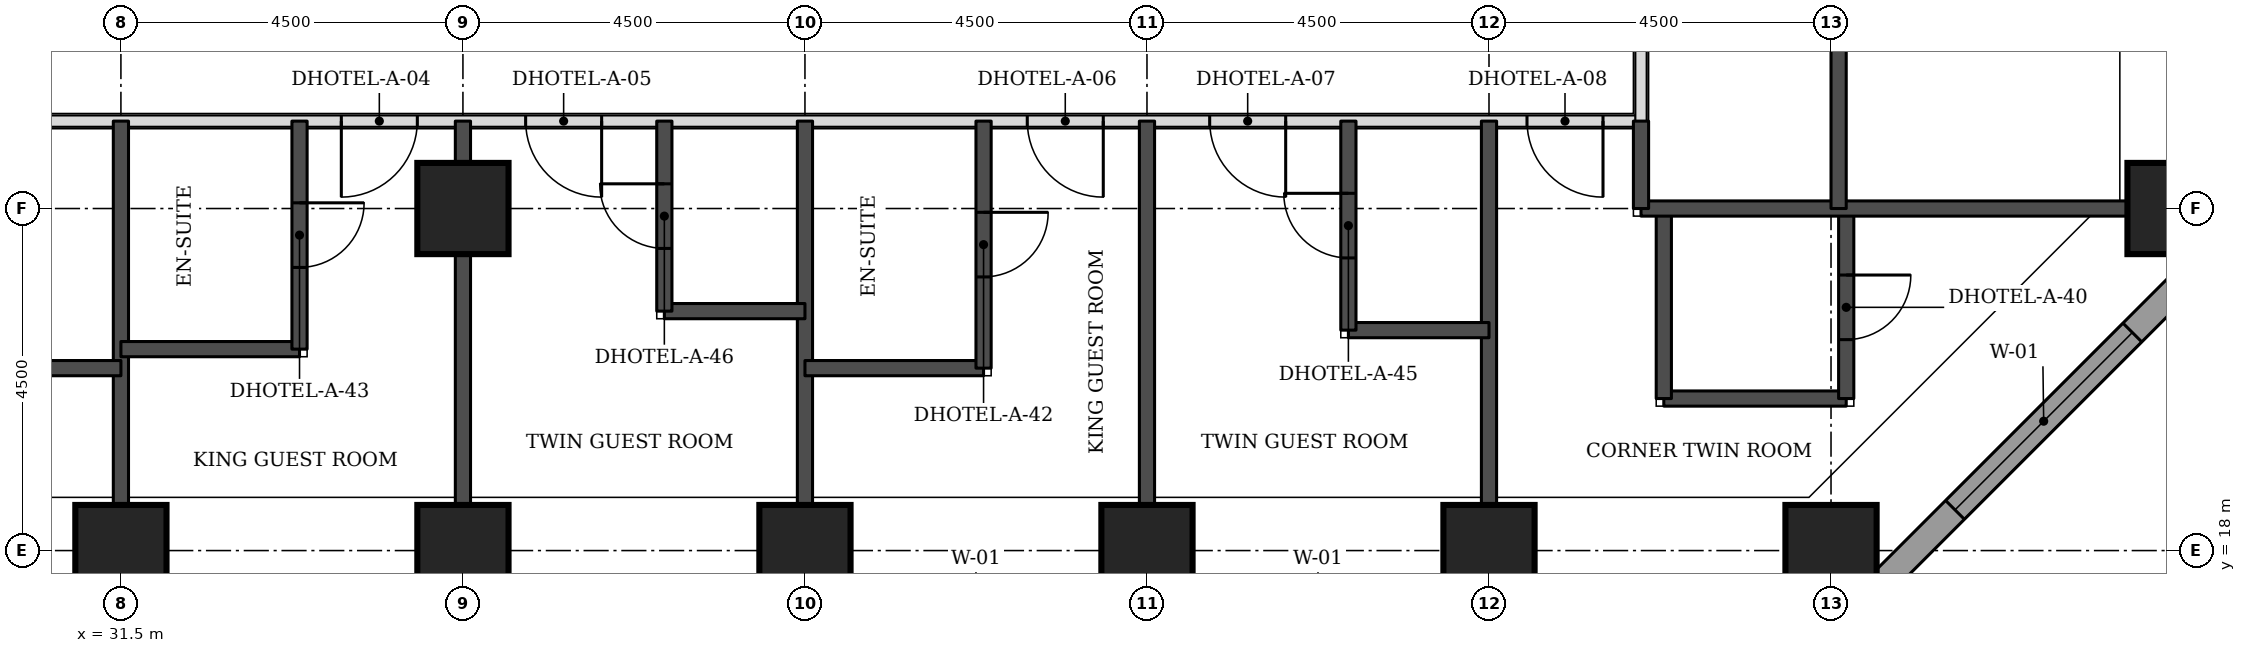
"""IFC4 building model, lengths in metres.
Left out: names, types, materials, properties, quantities, classifications, styles, units other than length and angle.
Written with IfcOpenShell. Run it as: python <this file> out.ifc"""

import sys

from ifc_helpers import new_model, si_unit, direction, frame, frame_2d, origin, origin_2d, place, context, subcontext, project, spatial, rectangle, extrude, element, fill, save


model = new_model("IFC4")
c1 = context("Model", 3, precision=1e-05, world=origin(), true_north=direction((0.0, 1.0)))
c2 = subcontext(c1, "Body", "Model", "MODEL_VIEW")
j1 = project(units=[si_unit("LENGTHUNIT", "METRE"), si_unit("PLANEANGLEUNIT", "RADIAN")], contexts=[c1])
p1 = place(None, origin())
s1 = spatial("IfcSite", under=j1, at=p1, CompositionType="ELEMENT")
p2 = place(p1, origin())
s2 = spatial("IfcBuilding", under=s1, at=p2, CompositionType="ELEMENT")
p3 = place(p2, frame((0.0, 0.0, 26.4)))
s3 = spatial("IfcBuildingStorey", under=s2, at=p3, CompositionType="ELEMENT", Elevation=26.4)
for number, where, z_axis, x_axis in (
    (1, (31.5, 18.0, 0.0), (0.0, 0.0, 1.0), (1.0, 0.0, 0.0)),
    (2, (36.0, 18.0, 0.0), (0.0, 0.0, 1.0), (1.0, 0.0, 0.0)),
    (3, (40.5, 18.0, 0.0), (0.0, 0.0, 1.0), (1.0, 0.0, 0.0)),
    (4, (45.0, 18.0, 0.0), (0.0, 0.0, 1.0), (1.0, 0.0, 0.0)),
    (5, (49.5, 18.0, 0.0), (0.0, 0.0, 1.0), (1.0, 0.0, 0.0)),
    (6, (54.0, 18.0, 0.0), (0.0, 0.0, 1.0), (1.0, 0.0, 0.0)),
    (7, (36.0, 22.5, 0.0), (0.0, 0.0, 1.0), (1.0, 0.0, 0.0)),
    (8, (58.5, 22.5, 0.0), (0.0, 0.0, 1.0), (1.0, 0.0, 0.0)),
):
    element("IfcColumn", number, at=place(p3, frame(where, z_axis=z_axis, x_axis=x_axis)), inside=s3, PredefinedType="COLUMN", context=c2, shape_type="SweptSolid", body=[
        extrude(rectangle(XDim=1.2, YDim=1.2, at=origin_2d()), origin(), (0.0, 0.0, 1.0), 3.3),
    ])
p4 = place(p3, frame((54.27, 17.174, 0.0), z_axis=(0.0, 0.0, 1.0), x_axis=(0.707106781187, 0.707106781187, 0.0)))
e9 = element("IfcWall", 9, at=p4, inside=s3, PredefinedType="STANDARD", context=c2, shape_type="SweptSolid", body=[
    extrude(rectangle(XDim=7.151, YDim=0.35, at=frame_2d((3.576, 0.0))), origin(), (0.0, 0.0, 1.0), 3.055),
])
p5 = place(p4, frame((1.926, 0.0, 0.8)))
e10 = element("IfcOpeningElement", 10, at=p5, cuts=e9, PredefinedType="OPENING", context=c2, shape_type="SweptSolid", body=[
    extrude(rectangle(XDim=3.3, YDim=1.5, at=frame_2d((1.65, 0.75))), frame((0.0, 0.185, 0.0), z_axis=(0.0, -1.0, 0.0), x_axis=(1.0, 0.0, 0.0)), (0.0, 0.0, 1.0), 0.37),
])
p6 = place(p3, frame((19.15, 23.65, 0.0), z_axis=(0.0, 0.0, 1.0), x_axis=(1.0, 0.0, 0.0)))
e11 = element("IfcWall", 11, at=p6, inside=s3, PredefinedType="PARTITIONING", context=c2, shape_type="SweptSolid", body=[
    extrude(rectangle(XDim=32.35, YDim=0.15, at=frame_2d((16.175, 0.0))), origin(), (0.0, 0.0, 1.0), 3.08),
])
p7 = place(p6, frame((6.275, 0.0, 0.0)))
e12 = element("IfcOpeningElement", 12, at=p7, cuts=e11, PredefinedType="OPENING", context=c2, shape_type="SweptSolid", body=[
    extrude(rectangle(XDim=1.0, YDim=2.1, at=frame_2d((0.5, 1.05))), frame((0.0, 0.085, 0.0), z_axis=(0.0, -1.0, 0.0), x_axis=(1.0, 0.0, 0.0)), (0.0, 0.0, 1.0), 0.17),
])
p8 = place(p6, frame((8.675, 0.0, 0.0)))
e13 = element("IfcOpeningElement", 13, at=p8, cuts=e11, PredefinedType="OPENING", context=c2, shape_type="SweptSolid", body=[
    extrude(rectangle(XDim=1.0, YDim=2.1, at=frame_2d((0.5, 1.05))), frame((0.0, 0.085, 0.0), z_axis=(0.0, -1.0, 0.0), x_axis=(1.0, 0.0, 0.0)), (0.0, 0.0, 1.0), 0.17),
])
p9 = place(p6, frame((15.25, 0.0, 0.0)))
e14 = element("IfcOpeningElement", 14, at=p9, cuts=e11, PredefinedType="OPENING", context=c2, shape_type="SweptSolid", body=[
    extrude(rectangle(XDim=1.0, YDim=2.1, at=frame_2d((0.5, 1.05))), frame((0.0, 0.085, 0.0), z_axis=(0.0, -1.0, 0.0), x_axis=(1.0, 0.0, 0.0)), (0.0, 0.0, 1.0), 0.17),
])
p10 = place(p6, frame((17.675, 0.0, 0.0)))
e15 = element("IfcOpeningElement", 15, at=p10, cuts=e11, PredefinedType="OPENING", context=c2, shape_type="SweptSolid", body=[
    extrude(rectangle(XDim=1.0, YDim=2.1, at=frame_2d((0.5, 1.05))), frame((0.0, 0.085, 0.0), z_axis=(0.0, -1.0, 0.0), x_axis=(1.0, 0.0, 0.0)), (0.0, 0.0, 1.0), 0.17),
])
p11 = place(p6, frame((24.275, 0.0, 0.0)))
e16 = element("IfcOpeningElement", 16, at=p11, cuts=e11, PredefinedType="OPENING", context=c2, shape_type="SweptSolid", body=[
    extrude(rectangle(XDim=1.0, YDim=2.1, at=frame_2d((0.5, 1.05))), frame((0.0, 0.085, 0.0), z_axis=(0.0, -1.0, 0.0), x_axis=(1.0, 0.0, 0.0)), (0.0, 0.0, 1.0), 0.17),
])
p12 = place(p6, frame((26.675, 0.0, 0.0)))
e17 = element("IfcOpeningElement", 17, at=p12, cuts=e11, PredefinedType="OPENING", context=c2, shape_type="SweptSolid", body=[
    extrude(rectangle(XDim=1.0, YDim=2.1, at=frame_2d((0.5, 1.05))), frame((0.0, 0.085, 0.0), z_axis=(0.0, -1.0, 0.0), x_axis=(1.0, 0.0, 0.0)), (0.0, 0.0, 1.0), 0.17),
])
p13 = place(p6, frame((1.175, 0.0, 0.0)))
e18 = element("IfcOpeningElement", 18, at=p13, cuts=e11, PredefinedType="OPENING", context=c2, shape_type="SweptSolid", body=[
    extrude(rectangle(XDim=1.0, YDim=2.1, at=frame_2d((0.5, 1.05))), frame((0.0, 0.085, 0.0), z_axis=(0.0, -1.0, 0.0), x_axis=(1.0, 0.0, 0.0)), (0.0, 0.0, 1.0), 0.17),
])
p14 = place(p6, frame((30.85, 0.0, 0.0)))
e19 = element("IfcOpeningElement", 19, at=p14, cuts=e11, PredefinedType="OPENING", context=c2, shape_type="SweptSolid", body=[
    extrude(rectangle(XDim=1.0, YDim=2.1, at=frame_2d((0.5, 1.05))), frame((0.0, 0.085, 0.0), z_axis=(0.0, -1.0, 0.0), x_axis=(1.0, 0.0, 0.0)), (0.0, 0.0, 1.0), 0.17),
])
p15 = place(p3, frame((51.5, 23.65, 0.0), z_axis=(0.0, 0.0, 1.0), x_axis=(0.0, 1.0, 0.0)))
e20 = element("IfcWall", 20, at=p15, inside=s3, PredefinedType="PARTITIONING", context=c2, shape_type="SweptSolid", body=[
    extrude(rectangle(XDim=23.85, YDim=0.15, at=frame_2d((11.925, 0.0))), origin(), (0.0, 0.0, 1.0), 3.08),
])
p16 = place(p15, frame((4.075, 0.0, 0.0)))
e21 = element("IfcOpeningElement", 21, at=p16, cuts=e20, PredefinedType="OPENING", context=c2, shape_type="SweptSolid", body=[
    extrude(rectangle(XDim=1.0, YDim=2.1, at=frame_2d((0.5, 1.05))), frame((0.0, 0.085, 0.0), z_axis=(0.0, -1.0, 0.0), x_axis=(1.0, 0.0, 0.0)), (0.0, 0.0, 1.0), 0.17),
])
p17 = place(p15, frame((10.375, 0.0, 0.0)))
e22 = element("IfcOpeningElement", 22, at=p17, cuts=e20, PredefinedType="OPENING", context=c2, shape_type="SweptSolid", body=[
    extrude(rectangle(XDim=1.0, YDim=2.1, at=frame_2d((0.5, 1.05))), frame((0.0, 0.085, 0.0), z_axis=(0.0, -1.0, 0.0), x_axis=(1.0, 0.0, 0.0)), (0.0, 0.0, 1.0), 0.17),
])
p18 = place(p15, frame((19.9, 0.0, 0.0)))
e23 = element("IfcOpeningElement", 23, at=p18, cuts=e20, PredefinedType="OPENING", context=c2, shape_type="SweptSolid", body=[
    extrude(rectangle(XDim=0.9, YDim=2.1, at=frame_2d((0.45, 1.05))), frame((0.0, 0.085, 0.0), z_axis=(0.0, -1.0, 0.0), x_axis=(1.0, 0.0, 0.0)), (0.0, 0.0, 1.0), 0.17),
])
for number, where, z_axis, x_axis in (
    (24, (31.5, 18.6, 0.0), (0.0, 0.0, 1.0), (0.0, 1.0, 0.0)),
    (25, (36.0, 18.6, 0.0), (0.0, 0.0, 1.0), (0.0, 1.0, 0.0)),
    (26, (40.5, 18.6, 0.0), (0.0, 0.0, 1.0), (0.0, 1.0, 0.0)),
    (27, (45.0, 18.6, 0.0), (0.0, 0.0, 1.0), (0.0, 1.0, 0.0)),
    (28, (49.5, 18.6, 0.0), (0.0, 0.0, 1.0), (0.0, 1.0, 0.0)),
):
    element("IfcWall", number, at=place(p3, frame(where, z_axis=z_axis, x_axis=x_axis)), inside=s3, PredefinedType="SOLIDWALL", context=c2, shape_type="SweptSolid", body=[
        extrude(rectangle(XDim=5.05, YDim=0.2, at=frame_2d((2.525, 0.0))), origin(), (0.0, 0.0, 1.0), 3.08),
    ])
p19 = place(p3, frame((51.8, 20.0, 0.0), z_axis=(0.0, 0.0, 1.0), x_axis=(1.0, 0.0, 0.0)))
e29 = element("IfcWall", 29, at=p19, inside=s3, PredefinedType="SOLIDWALL", context=c2, shape_type="SweptSolid", body=[
    extrude(rectangle(XDim=2.4, YDim=0.2, at=frame_2d((1.2, 0.0))), origin(), (0.0, 0.0, 1.0), 3.08),
])
p20 = place(p3, frame((51.8, 20.0, 0.0), z_axis=(0.0, 0.0, 1.0), x_axis=(0.0, 1.0, 0.0)))
e30 = element("IfcWall", 30, at=p20, inside=s3, PredefinedType="SOLIDWALL", context=c2, shape_type="SweptSolid", body=[
    extrude(rectangle(XDim=2.5, YDim=0.2, at=frame_2d((1.25, 0.0))), origin(), (0.0, 0.0, 1.0), 3.08),
])
p21 = place(p3, frame((54.2, 20.0, 0.0), z_axis=(0.0, 0.0, 1.0), x_axis=(0.0, 1.0, 0.0)))
e31 = element("IfcWall", 31, at=p21, inside=s3, PredefinedType="SOLIDWALL", context=c2, shape_type="SweptSolid", body=[
    extrude(rectangle(XDim=2.5, YDim=0.2, at=frame_2d((1.25, 0.0))), origin(), (0.0, 0.0, 1.0), 3.08),
])
p22 = place(p21, frame((0.775, 0.0, 0.0)))
e32 = element("IfcOpeningElement", 32, at=p22, cuts=e31, PredefinedType="OPENING", context=c2, shape_type="SweptSolid", body=[
    extrude(rectangle(XDim=0.85, YDim=2.1, at=frame_2d((0.425, 1.05))), frame((0.0, 0.11, 0.0), z_axis=(0.0, -1.0, 0.0), x_axis=(1.0, 0.0, 0.0)), (0.0, 0.0, 1.0), 0.22),
])
p23 = place(p3, frame((29.65, 20.4, 0.0), z_axis=(0.0, 0.0, 1.0), x_axis=(1.0, 0.0, 0.0)))
e33 = element("IfcWall", 33, at=p23, inside=s3, PredefinedType="SOLIDWALL", context=c2, shape_type="SweptSolid", body=[
    extrude(rectangle(XDim=1.85, YDim=0.2, at=frame_2d((0.925, 0.0))), origin(), (0.0, 0.0, 1.0), 3.08),
])
p24 = place(p3, frame((40.5, 20.4, 0.0), z_axis=(0.0, 0.0, 1.0), x_axis=(1.0, 0.0, 0.0)))
e34 = element("IfcWall", 34, at=p24, inside=s3, PredefinedType="SOLIDWALL", context=c2, shape_type="SweptSolid", body=[
    extrude(rectangle(XDim=2.35, YDim=0.2, at=frame_2d((1.175, 0.0))), origin(), (0.0, 0.0, 1.0), 3.08),
])
p25 = place(p3, frame((42.85, 20.4, 0.0), z_axis=(0.0, 0.0, 1.0), x_axis=(0.0, 1.0, 0.0)))
e35 = element("IfcWall", 35, at=p25, inside=s3, PredefinedType="SOLIDWALL", context=c2, shape_type="SweptSolid", body=[
    extrude(rectangle(XDim=3.25, YDim=0.2, at=frame_2d((1.625, 0.0))), origin(), (0.0, 0.0, 1.0), 3.08),
])
p26 = place(p25, frame((1.2, 0.0, 0.0)))
e36 = element("IfcOpeningElement", 36, at=p26, cuts=e35, PredefinedType="OPENING", context=c2, shape_type="SweptSolid", body=[
    extrude(rectangle(XDim=0.85, YDim=2.1, at=frame_2d((0.425, 1.05))), frame((0.0, 0.11, 0.0), z_axis=(0.0, -1.0, 0.0), x_axis=(1.0, 0.0, 0.0)), (0.0, 0.0, 1.0), 0.22),
])
p27 = place(p3, frame((31.5, 20.65, 0.0), z_axis=(0.0, 0.0, 1.0), x_axis=(1.0, 0.0, 0.0)))
e37 = element("IfcWall", 37, at=p27, inside=s3, PredefinedType="SOLIDWALL", context=c2, shape_type="SweptSolid", body=[
    extrude(rectangle(XDim=2.35, YDim=0.2, at=frame_2d((1.175, 0.0))), origin(), (0.0, 0.0, 1.0), 3.08),
])
p28 = place(p3, frame((33.85, 20.65, 0.0), z_axis=(0.0, 0.0, 1.0), x_axis=(0.0, 1.0, 0.0)))
e38 = element("IfcWall", 38, at=p28, inside=s3, PredefinedType="SOLIDWALL", context=c2, shape_type="SweptSolid", body=[
    extrude(rectangle(XDim=3.0, YDim=0.2, at=frame_2d((1.5, 0.0))), origin(), (0.0, 0.0, 1.0), 3.08),
])
p29 = place(p28, frame((1.075, 0.0, 0.0)))
e39 = element("IfcOpeningElement", 39, at=p29, cuts=e38, PredefinedType="OPENING", context=c2, shape_type="SweptSolid", body=[
    extrude(rectangle(XDim=0.85, YDim=2.1, at=frame_2d((0.425, 1.05))), frame((0.0, 0.11, 0.0), z_axis=(0.0, -1.0, 0.0), x_axis=(1.0, 0.0, 0.0)), (0.0, 0.0, 1.0), 0.22),
])
p30 = place(p3, frame((47.65, 20.9, 0.0), z_axis=(0.0, 0.0, 1.0), x_axis=(1.0, 0.0, 0.0)))
e40 = element("IfcWall", 40, at=p30, inside=s3, PredefinedType="SOLIDWALL", context=c2, shape_type="SweptSolid", body=[
    extrude(rectangle(XDim=1.85, YDim=0.2, at=frame_2d((0.925, 0.0))), origin(), (0.0, 0.0, 1.0), 3.08),
])
p31 = place(p3, frame((47.65, 20.9, 0.0), z_axis=(0.0, 0.0, 1.0), x_axis=(0.0, 1.0, 0.0)))
e41 = element("IfcWall", 41, at=p31, inside=s3, PredefinedType="SOLIDWALL", context=c2, shape_type="SweptSolid", body=[
    extrude(rectangle(XDim=2.75, YDim=0.2, at=frame_2d((1.375, 0.0))), origin(), (0.0, 0.0, 1.0), 3.08),
])
p32 = place(p31, frame((0.95, 0.0, 0.0)))
e42 = element("IfcOpeningElement", 42, at=p32, cuts=e41, PredefinedType="OPENING", context=c2, shape_type="SweptSolid", body=[
    extrude(rectangle(XDim=0.85, YDim=2.1, at=frame_2d((0.425, 1.05))), frame((0.0, 0.11, 0.0), z_axis=(0.0, -1.0, 0.0), x_axis=(1.0, 0.0, 0.0)), (0.0, 0.0, 1.0), 0.22),
])
p33 = place(p3, frame((38.65, 21.15, 0.0), z_axis=(0.0, 0.0, 1.0), x_axis=(1.0, 0.0, 0.0)))
e43 = element("IfcWall", 43, at=p33, inside=s3, PredefinedType="SOLIDWALL", context=c2, shape_type="SweptSolid", body=[
    extrude(rectangle(XDim=1.85, YDim=0.2, at=frame_2d((0.925, 0.0))), origin(), (0.0, 0.0, 1.0), 3.08),
])
p34 = place(p3, frame((38.65, 21.15, 0.0), z_axis=(0.0, 0.0, 1.0), x_axis=(0.0, 1.0, 0.0)))
e44 = element("IfcWall", 44, at=p34, inside=s3, PredefinedType="SOLIDWALL", context=c2, shape_type="SweptSolid", body=[
    extrude(rectangle(XDim=2.5, YDim=0.2, at=frame_2d((1.25, 0.0))), origin(), (0.0, 0.0, 1.0), 3.08),
])
p35 = place(p34, frame((0.825, 0.0, 0.0)))
e45 = element("IfcOpeningElement", 45, at=p35, cuts=e44, PredefinedType="OPENING", context=c2, shape_type="SweptSolid", body=[
    extrude(rectangle(XDim=0.85, YDim=2.1, at=frame_2d((0.425, 1.05))), frame((0.0, 0.11, 0.0), z_axis=(0.0, -1.0, 0.0), x_axis=(1.0, 0.0, 0.0)), (0.0, 0.0, 1.0), 0.22),
])
p36 = place(p3, frame((51.5, 22.5, 0.0), z_axis=(0.0, 0.0, 1.0), x_axis=(1.0, 0.0, 0.0)))
e46 = element("IfcWall", 46, at=p36, inside=s3, PredefinedType="SOLIDWALL", context=c2, shape_type="SweptSolid", body=[
    extrude(rectangle(XDim=6.4, YDim=0.2, at=frame_2d((3.2, 0.0))), origin(), (0.0, 0.0, 1.0), 3.08),
])
p37 = place(p3, frame((51.5, 22.5, 0.0), z_axis=(0.0, 0.0, 1.0), x_axis=(0.0, 1.0, 0.0)))
e47 = element("IfcWall", 47, at=p37, inside=s3, PredefinedType="SOLIDWALL", context=c2, shape_type="SweptSolid", body=[
    extrude(rectangle(XDim=1.15, YDim=0.2, at=frame_2d((0.575, 0.0))), origin(), (0.0, 0.0, 1.0), 3.08),
])
p38 = place(p3, frame((54.1, 22.5, 0.0), z_axis=(0.0, 0.0, 1.0), x_axis=(0.0, 1.0, 0.0)))
e48 = element("IfcWall", 48, at=p38, inside=s3, PredefinedType="SOLIDWALL", context=c2, shape_type="SweptSolid", body=[
    extrude(rectangle(XDim=2.45, YDim=0.2, at=frame_2d((1.225, 0.0))), origin(), (0.0, 0.0, 1.0), 3.08),
])
p39 = place(p5, origin())
e49 = element("IfcWindow", 49, at=p39, inside=s3, PartitioningType="SINGLE_PANEL", PredefinedType="WINDOW", context=c2, shape_type="SweptSolid", body=[
    extrude(rectangle(XDim=3.3, YDim=1.5, at=frame_2d((1.65, 0.75))), frame((0.0, 0.085, 0.0), z_axis=(0.0, -1.0, 0.0), x_axis=(1.0, 0.0, 0.0)), (0.0, 0.0, 1.0), 0.06),
])
fill(e10, e49)
p40 = place(p9, frame((1.0, 0.0, 0.0), z_axis=(0.0, 0.0, 1.0), x_axis=(-1.0, 0.0, 0.0)))
e50 = element("IfcDoor", 50, at=p40, inside=s3, OperationType="SINGLE_SWING_RIGHT", PredefinedType="DOOR", context=c2, shape_type="SweptSolid", body=[
    extrude(rectangle(XDim=1.0, YDim=2.1, at=frame_2d((0.5, 1.05))), frame((0.0, 0.025, 0.0), z_axis=(0.0, -1.0, 0.0), x_axis=(1.0, 0.0, 0.0)), (0.0, 0.0, 1.0), 0.05),
])
fill(e14, e50)
p41 = place(p29, frame((0.85, 0.0, 0.0), z_axis=(0.0, 0.0, 1.0), x_axis=(-1.0, 0.0, 0.0)))
e51 = element("IfcDoor", 51, at=p41, inside=s3, OperationType="SINGLE_SWING_LEFT", PredefinedType="DOOR", context=c2, shape_type="SweptSolid", body=[
    extrude(rectangle(XDim=0.85, YDim=2.1, at=frame_2d((0.425, 1.05))), frame((0.0, 0.025, 0.0), z_axis=(0.0, -1.0, 0.0), x_axis=(1.0, 0.0, 0.0)), (0.0, 0.0, 1.0), 0.05),
])
fill(e39, e51)
p42 = place(p10, frame((1.0, 0.0, 0.0), z_axis=(0.0, 0.0, 1.0), x_axis=(-1.0, 0.0, 0.0)))
e52 = element("IfcDoor", 52, at=p42, inside=s3, OperationType="SINGLE_SWING_LEFT", PredefinedType="DOOR", context=c2, shape_type="SweptSolid", body=[
    extrude(rectangle(XDim=1.0, YDim=2.1, at=frame_2d((0.5, 1.05))), frame((0.0, 0.025, 0.0), z_axis=(0.0, -1.0, 0.0), x_axis=(1.0, 0.0, 0.0)), (0.0, 0.0, 1.0), 0.05),
])
fill(e15, e52)
p43 = place(p35, origin())
e53 = element("IfcDoor", 53, at=p43, inside=s3, OperationType="SINGLE_SWING_RIGHT", PredefinedType="DOOR", context=c2, shape_type="SweptSolid", body=[
    extrude(rectangle(XDim=0.85, YDim=2.1, at=frame_2d((0.425, 1.05))), frame((0.0, 0.025, 0.0), z_axis=(0.0, -1.0, 0.0), x_axis=(1.0, 0.0, 0.0)), (0.0, 0.0, 1.0), 0.05),
])
fill(e45, e53)
p44 = place(p11, frame((1.0, 0.0, 0.0), z_axis=(0.0, 0.0, 1.0), x_axis=(-1.0, 0.0, 0.0)))
e54 = element("IfcDoor", 54, at=p44, inside=s3, OperationType="SINGLE_SWING_LEFT", PredefinedType="DOOR", context=c2, shape_type="SweptSolid", body=[
    extrude(rectangle(XDim=1.0, YDim=2.1, at=frame_2d((0.5, 1.05))), frame((0.0, 0.025, 0.0), z_axis=(0.0, -1.0, 0.0), x_axis=(1.0, 0.0, 0.0)), (0.0, 0.0, 1.0), 0.05),
])
fill(e16, e54)
p45 = place(p26, frame((0.85, 0.0, 0.0), z_axis=(0.0, 0.0, 1.0), x_axis=(-1.0, 0.0, 0.0)))
e55 = element("IfcDoor", 55, at=p45, inside=s3, OperationType="SINGLE_SWING_LEFT", PredefinedType="DOOR", context=c2, shape_type="SweptSolid", body=[
    extrude(rectangle(XDim=0.85, YDim=2.1, at=frame_2d((0.425, 1.05))), frame((0.0, 0.025, 0.0), z_axis=(0.0, -1.0, 0.0), x_axis=(1.0, 0.0, 0.0)), (0.0, 0.0, 1.0), 0.05),
])
fill(e36, e55)
p46 = place(p12, frame((1.0, 0.0, 0.0), z_axis=(0.0, 0.0, 1.0), x_axis=(-1.0, 0.0, 0.0)))
e56 = element("IfcDoor", 56, at=p46, inside=s3, OperationType="SINGLE_SWING_LEFT", PredefinedType="DOOR", context=c2, shape_type="SweptSolid", body=[
    extrude(rectangle(XDim=1.0, YDim=2.1, at=frame_2d((0.5, 1.05))), frame((0.0, 0.025, 0.0), z_axis=(0.0, -1.0, 0.0), x_axis=(1.0, 0.0, 0.0)), (0.0, 0.0, 1.0), 0.05),
])
fill(e17, e56)
p47 = place(p32, origin())
e57 = element("IfcDoor", 57, at=p47, inside=s3, OperationType="SINGLE_SWING_RIGHT", PredefinedType="DOOR", context=c2, shape_type="SweptSolid", body=[
    extrude(rectangle(XDim=0.85, YDim=2.1, at=frame_2d((0.425, 1.05))), frame((0.0, 0.025, 0.0), z_axis=(0.0, -1.0, 0.0), x_axis=(1.0, 0.0, 0.0)), (0.0, 0.0, 1.0), 0.05),
])
fill(e42, e57)
p48 = place(p14, frame((1.0, 0.0, 0.0), z_axis=(0.0, 0.0, 1.0), x_axis=(-1.0, 0.0, 0.0)))
e58 = element("IfcDoor", 58, at=p48, inside=s3, OperationType="SINGLE_SWING_LEFT", PredefinedType="DOOR", context=c2, shape_type="SweptSolid", body=[
    extrude(rectangle(XDim=1.0, YDim=2.1, at=frame_2d((0.5, 1.05))), frame((0.0, 0.025, 0.0), z_axis=(0.0, -1.0, 0.0), x_axis=(1.0, 0.0, 0.0)), (0.0, 0.0, 1.0), 0.05),
])
fill(e19, e58)
p49 = place(p22, frame((0.85, 0.0, 0.0), z_axis=(0.0, 0.0, 1.0), x_axis=(-1.0, 0.0, 0.0)))
e59 = element("IfcDoor", 59, at=p49, inside=s3, OperationType="SINGLE_SWING_LEFT", PredefinedType="DOOR", context=c2, shape_type="SweptSolid", body=[
    extrude(rectangle(XDim=0.85, YDim=2.1, at=frame_2d((0.425, 1.05))), frame((0.0, 0.025, 0.0), z_axis=(0.0, -1.0, 0.0), x_axis=(1.0, 0.0, 0.0)), (0.0, 0.0, 1.0), 0.05),
])
fill(e32, e59)
save(model, sys.argv[1])
